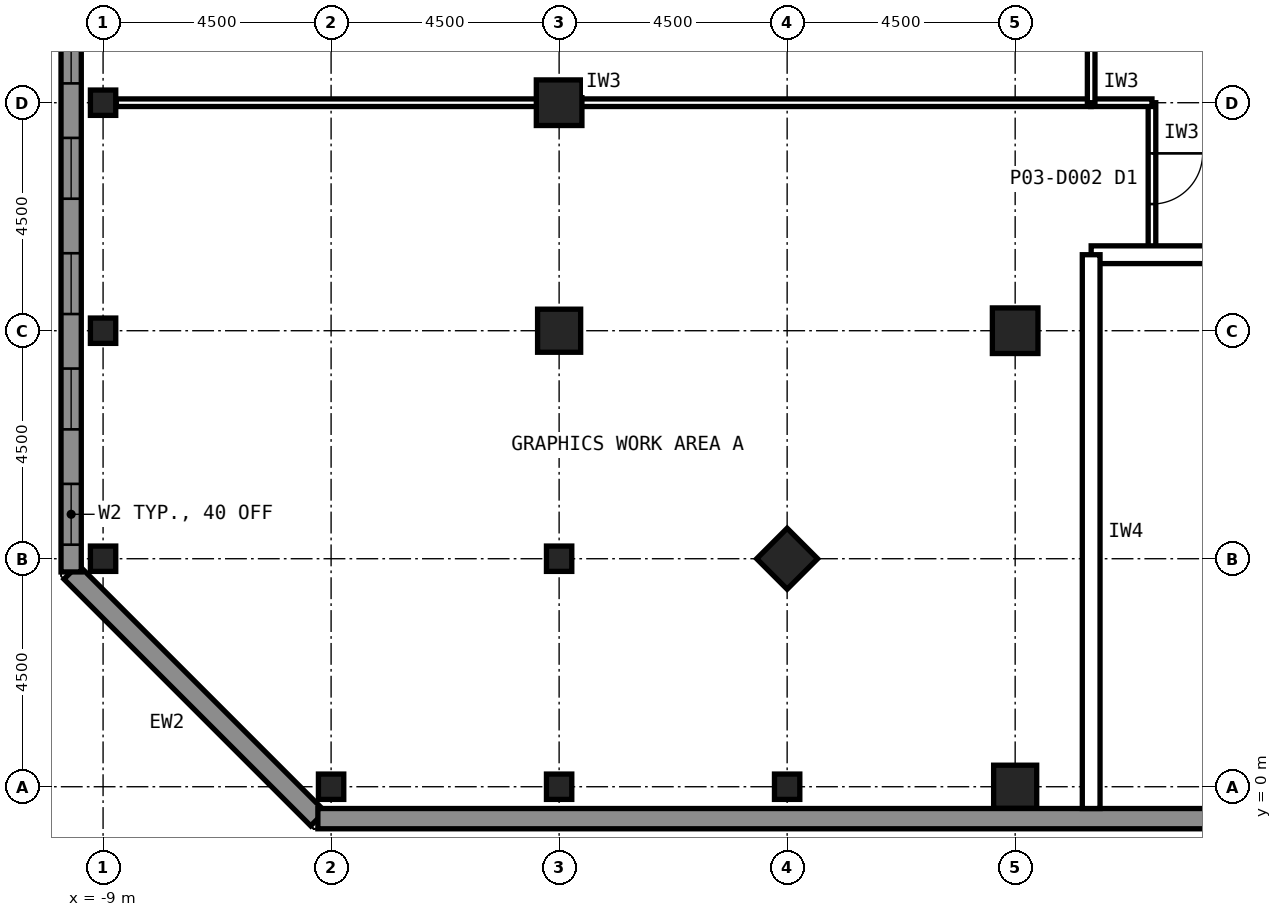
"""IFC4 building model, lengths in metres.
Left out: names, types, materials, properties, quantities, classifications, styles, units other than length and angle.
Written with IfcOpenShell. Run it as: python <this file> out.ifc"""

import sys

from ifc_helpers import new_model, si_unit, direction, frame, frame_2d, origin, origin_2d, place, context, subcontext, project, spatial, rectangle, hollow_rectangle, extrude, element, fill, save


model = new_model("IFC4")
c1 = context("Model", 3, precision=1e-05, world=origin(), true_north=direction((0.0, 1.0)))
c2 = subcontext(c1, "Body", "Model", "MODEL_VIEW")
j1 = project(units=[si_unit("LENGTHUNIT", "METRE"), si_unit("PLANEANGLEUNIT", "RADIAN")], contexts=[c1])
p1 = place(None, origin())
s1 = spatial("IfcSite", under=j1, at=p1, CompositionType="ELEMENT")
p2 = place(p1, origin())
s2 = spatial("IfcBuilding", under=s1, at=p2, CompositionType="ELEMENT")
p3 = place(p2, frame((0.0, 0.0, 12.0)))
s3 = spatial("IfcBuildingStorey", under=s2, at=p3, CompositionType="ELEMENT", Elevation=12.0)
p4 = place(p3, frame((9.0, 0.0, 0.0), z_axis=(0.0, 0.0, 1.0), x_axis=(1.0, 0.0, 0.0)))
e1 = element("IfcColumn", 1, at=p4, inside=s3, PredefinedType="COLUMN", context=c2, shape_type="SweptSolid", body=[
    extrude(hollow_rectangle(XDim=0.85, YDim=0.85, WallThickness=0.05, at=origin_2d()), origin(), (0.0, 0.0, 1.0), 6.0),
])
p5 = place(p3, frame((0.0, 13.5, 0.0), z_axis=(0.0, 0.0, 1.0), x_axis=(1.0, 0.0, 0.0)))
e2 = element("IfcColumn", 2, at=p5, inside=s3, PredefinedType="COLUMN", context=c2, shape_type="SweptSolid", body=[
    extrude(hollow_rectangle(XDim=0.9, YDim=0.9, WallThickness=0.063, at=origin_2d()), origin(), (0.0, 0.0, 1.0), 6.0),
])
for number, where, z_axis, x_axis in (
    (3, (0.0, 9.0, 0.0), (0.0, 0.0, 1.0), (1.0, 0.0, 0.0)),
    (4, (4.5, 4.5, 0.0), (0.0, 0.0, 1.0), (0.707, 0.707, 0.0)),
):
    element("IfcColumn", number, at=place(p3, frame(where, z_axis=z_axis, x_axis=x_axis)), inside=s3, PredefinedType="COLUMN", context=c2, shape_type="SweptSolid", body=[
        extrude(hollow_rectangle(XDim=0.85, YDim=0.85, WallThickness=0.05, at=origin_2d()), origin(), (0.0, 0.0, 1.0), 6.0),
    ])
p6 = place(p3, frame((9.0, 9.0, 0.0), z_axis=(0.0, 0.0, 1.0), x_axis=(1.0, 0.0, 0.0)))
e5 = element("IfcColumn", 5, at=p6, inside=s3, PredefinedType="COLUMN", context=c2, shape_type="SweptSolid", body=[
    extrude(hollow_rectangle(XDim=0.9, YDim=0.9, WallThickness=0.063, at=origin_2d()), origin(), (0.0, 0.0, 1.0), 6.0),
])
for number, where, z_axis, x_axis in (
    (6, (-9.0, 4.5, 0.0), (0.0, 0.0, 1.0), (1.0, 0.0, 0.0)),
    (7, (-9.0, 9.0, 0.0), (0.0, 0.0, 1.0), (1.0, 0.0, 0.0)),
    (8, (-9.0, 13.5, 0.0), (0.0, 0.0, 1.0), (1.0, 0.0, 0.0)),
    (9, (-4.5, 0.0, 0.0), (0.0, 0.0, 1.0), (1.0, 0.0, 0.0)),
    (10, (0.0, 0.0, 0.0), (0.0, 0.0, 1.0), (1.0, 0.0, 0.0)),
    (11, (4.5, 0.0, 0.0), (0.0, 0.0, 1.0), (1.0, 0.0, 0.0)),
    (12, (0.0, 4.5, 0.0), (0.0, 0.0, 1.0), (1.0, 0.0, 0.0)),
):
    element("IfcColumn", number, at=place(p3, frame(where, z_axis=z_axis, x_axis=x_axis)), inside=s3, PredefinedType="COLUMN", context=c2, shape_type="SweptSolid", body=[
        extrude(hollow_rectangle(XDim=0.5, YDim=0.5, WallThickness=0.022, at=origin_2d()), origin(), (0.0, 0.0, 1.0), 6.0),
    ])
p7 = place(p3, frame((-4.761, -0.63, 0.0), z_axis=(0.0, 0.0, 1.0), x_axis=(-0.707106781187, 0.707106781187, 0.0)))
e13 = element("IfcWall", 13, at=p7, inside=s3, PredefinedType="SOLIDWALL", context=c2, shape_type="SweptSolid", body=[
    extrude(rectangle(XDim=6.886, YDim=0.4, at=frame_2d((3.443, 0.0))), origin(), (0.0, 0.0, 1.0), 6.0),
])
p8 = place(p3, frame((-9.63, 4.239, 0.0), z_axis=(0.0, 0.0, 1.0), x_axis=(0.0, 1.0, 0.0)))
e14 = element("IfcWall", 14, at=p8, inside=s3, PredefinedType="SOLIDWALL", context=c2, shape_type="SweptSolid", body=[
    extrude(rectangle(XDim=45.522, YDim=0.4, at=frame_2d((22.761, 0.0))), origin(), (0.0, 0.0, 1.0), 6.0),
])
p9 = place(p8, frame((0.538, 0.0, 0.9)))
e15 = element("IfcOpeningElement", 15, at=p9, cuts=e14, PredefinedType="OPENING", context=c2, shape_type="SweptSolid", body=[
    extrude(rectangle(XDim=1.2, YDim=1.5, at=frame_2d((0.6, 0.75))), frame((0.0, 0.21, 0.0), z_axis=(0.0, -1.0, 0.0), x_axis=(1.0, 0.0, 0.0)), (0.0, 0.0, 1.0), 0.42),
])
p10 = place(p8, frame((2.814, 0.0, 0.9)))
e16 = element("IfcOpeningElement", 16, at=p10, cuts=e14, PredefinedType="OPENING", context=c2, shape_type="SweptSolid", body=[
    extrude(rectangle(XDim=1.2, YDim=1.5, at=frame_2d((0.6, 0.75))), frame((0.0, 0.21, 0.0), z_axis=(0.0, -1.0, 0.0), x_axis=(1.0, 0.0, 0.0)), (0.0, 0.0, 1.0), 0.42),
])
p11 = place(p8, frame((5.09, 0.0, 0.9)))
e17 = element("IfcOpeningElement", 17, at=p11, cuts=e14, PredefinedType="OPENING", context=c2, shape_type="SweptSolid", body=[
    extrude(rectangle(XDim=1.2, YDim=1.5, at=frame_2d((0.6, 0.75))), frame((0.0, 0.21, 0.0), z_axis=(0.0, -1.0, 0.0), x_axis=(1.0, 0.0, 0.0)), (0.0, 0.0, 1.0), 0.42),
])
p12 = place(p8, frame((7.366, 0.0, 0.9)))
e18 = element("IfcOpeningElement", 18, at=p12, cuts=e14, PredefinedType="OPENING", context=c2, shape_type="SweptSolid", body=[
    extrude(rectangle(XDim=1.2, YDim=1.5, at=frame_2d((0.6, 0.75))), frame((0.0, 0.21, 0.0), z_axis=(0.0, -1.0, 0.0), x_axis=(1.0, 0.0, 0.0)), (0.0, 0.0, 1.0), 0.42),
])
p13 = place(p8, frame((9.642, 0.0, 0.9)))
e19 = element("IfcOpeningElement", 19, at=p13, cuts=e14, PredefinedType="OPENING", context=c2, shape_type="SweptSolid", body=[
    extrude(rectangle(XDim=1.2, YDim=1.5, at=frame_2d((0.6, 0.75))), frame((0.0, 0.21, 0.0), z_axis=(0.0, -1.0, 0.0), x_axis=(1.0, 0.0, 0.0)), (0.0, 0.0, 1.0), 0.42),
])
p14 = place(p8, frame((11.918, 0.0, 0.9)))
e20 = element("IfcOpeningElement", 20, at=p14, cuts=e14, PredefinedType="OPENING", context=c2, shape_type="SweptSolid", body=[
    extrude(rectangle(XDim=1.2, YDim=1.5, at=frame_2d((0.6, 0.75))), frame((0.0, 0.21, 0.0), z_axis=(0.0, -1.0, 0.0), x_axis=(1.0, 0.0, 0.0)), (0.0, 0.0, 1.0), 0.42),
])
p15 = place(p8, frame((14.195, 0.0, 0.9)))
e21 = element("IfcOpeningElement", 21, at=p15, cuts=e14, PredefinedType="OPENING", context=c2, shape_type="SweptSolid", body=[
    extrude(rectangle(XDim=1.2, YDim=1.5, at=frame_2d((0.6, 0.75))), frame((0.0, 0.21, 0.0), z_axis=(0.0, -1.0, 0.0), x_axis=(1.0, 0.0, 0.0)), (0.0, 0.0, 1.0), 0.42),
])
p16 = place(p8, frame((16.471, 0.0, 0.9)))
e22 = element("IfcOpeningElement", 22, at=p16, cuts=e14, PredefinedType="OPENING", context=c2, shape_type="SweptSolid", body=[
    extrude(rectangle(XDim=1.2, YDim=1.5, at=frame_2d((0.6, 0.75))), frame((0.0, 0.21, 0.0), z_axis=(0.0, -1.0, 0.0), x_axis=(1.0, 0.0, 0.0)), (0.0, 0.0, 1.0), 0.42),
])
p17 = place(p8, frame((18.747, 0.0, 0.9)))
e23 = element("IfcOpeningElement", 23, at=p17, cuts=e14, PredefinedType="OPENING", context=c2, shape_type="SweptSolid", body=[
    extrude(rectangle(XDim=1.2, YDim=1.5, at=frame_2d((0.6, 0.75))), frame((0.0, 0.21, 0.0), z_axis=(0.0, -1.0, 0.0), x_axis=(1.0, 0.0, 0.0)), (0.0, 0.0, 1.0), 0.42),
])
p18 = place(p8, frame((21.023, 0.0, 0.9)))
e24 = element("IfcOpeningElement", 24, at=p18, cuts=e14, PredefinedType="OPENING", context=c2, shape_type="SweptSolid", body=[
    extrude(rectangle(XDim=1.2, YDim=1.5, at=frame_2d((0.6, 0.75))), frame((0.0, 0.21, 0.0), z_axis=(0.0, -1.0, 0.0), x_axis=(1.0, 0.0, 0.0)), (0.0, 0.0, 1.0), 0.42),
])
p19 = place(p8, frame((23.299, 0.0, 0.9)))
e25 = element("IfcOpeningElement", 25, at=p19, cuts=e14, PredefinedType="OPENING", context=c2, shape_type="SweptSolid", body=[
    extrude(rectangle(XDim=1.2, YDim=1.5, at=frame_2d((0.6, 0.75))), frame((0.0, 0.21, 0.0), z_axis=(0.0, -1.0, 0.0), x_axis=(1.0, 0.0, 0.0)), (0.0, 0.0, 1.0), 0.42),
])
p20 = place(p8, frame((25.575, 0.0, 0.9)))
e26 = element("IfcOpeningElement", 26, at=p20, cuts=e14, PredefinedType="OPENING", context=c2, shape_type="SweptSolid", body=[
    extrude(rectangle(XDim=1.2, YDim=1.5, at=frame_2d((0.6, 0.75))), frame((0.0, 0.21, 0.0), z_axis=(0.0, -1.0, 0.0), x_axis=(1.0, 0.0, 0.0)), (0.0, 0.0, 1.0), 0.42),
])
p21 = place(p8, frame((27.851, 0.0, 0.9)))
e27 = element("IfcOpeningElement", 27, at=p21, cuts=e14, PredefinedType="OPENING", context=c2, shape_type="SweptSolid", body=[
    extrude(rectangle(XDim=1.2, YDim=1.5, at=frame_2d((0.6, 0.75))), frame((0.0, 0.21, 0.0), z_axis=(0.0, -1.0, 0.0), x_axis=(1.0, 0.0, 0.0)), (0.0, 0.0, 1.0), 0.42),
])
p22 = place(p8, frame((30.127, 0.0, 0.9)))
e28 = element("IfcOpeningElement", 28, at=p22, cuts=e14, PredefinedType="OPENING", context=c2, shape_type="SweptSolid", body=[
    extrude(rectangle(XDim=1.2, YDim=1.5, at=frame_2d((0.6, 0.75))), frame((0.0, 0.21, 0.0), z_axis=(0.0, -1.0, 0.0), x_axis=(1.0, 0.0, 0.0)), (0.0, 0.0, 1.0), 0.42),
])
p23 = place(p8, frame((32.404, 0.0, 0.9)))
e29 = element("IfcOpeningElement", 29, at=p23, cuts=e14, PredefinedType="OPENING", context=c2, shape_type="SweptSolid", body=[
    extrude(rectangle(XDim=1.2, YDim=1.5, at=frame_2d((0.6, 0.75))), frame((0.0, 0.21, 0.0), z_axis=(0.0, -1.0, 0.0), x_axis=(1.0, 0.0, 0.0)), (0.0, 0.0, 1.0), 0.42),
])
p24 = place(p8, frame((34.679, 0.0, 0.9)))
e30 = element("IfcOpeningElement", 30, at=p24, cuts=e14, PredefinedType="OPENING", context=c2, shape_type="SweptSolid", body=[
    extrude(rectangle(XDim=1.2, YDim=1.5, at=frame_2d((0.6, 0.75))), frame((0.0, 0.21, 0.0), z_axis=(0.0, -1.0, 0.0), x_axis=(1.0, 0.0, 0.0)), (0.0, 0.0, 1.0), 0.42),
])
p25 = place(p8, frame((36.956, 0.0, 0.9)))
e31 = element("IfcOpeningElement", 31, at=p25, cuts=e14, PredefinedType="OPENING", context=c2, shape_type="SweptSolid", body=[
    extrude(rectangle(XDim=1.2, YDim=1.5, at=frame_2d((0.6, 0.75))), frame((0.0, 0.21, 0.0), z_axis=(0.0, -1.0, 0.0), x_axis=(1.0, 0.0, 0.0)), (0.0, 0.0, 1.0), 0.42),
])
p26 = place(p8, frame((39.232, 0.0, 0.9)))
e32 = element("IfcOpeningElement", 32, at=p26, cuts=e14, PredefinedType="OPENING", context=c2, shape_type="SweptSolid", body=[
    extrude(rectangle(XDim=1.2, YDim=1.5, at=frame_2d((0.6, 0.75))), frame((0.0, 0.21, 0.0), z_axis=(0.0, -1.0, 0.0), x_axis=(1.0, 0.0, 0.0)), (0.0, 0.0, 1.0), 0.42),
])
p27 = place(p8, frame((41.508, 0.0, 0.9)))
e33 = element("IfcOpeningElement", 33, at=p27, cuts=e14, PredefinedType="OPENING", context=c2, shape_type="SweptSolid", body=[
    extrude(rectangle(XDim=1.2, YDim=1.5, at=frame_2d((0.6, 0.75))), frame((0.0, 0.21, 0.0), z_axis=(0.0, -1.0, 0.0), x_axis=(1.0, 0.0, 0.0)), (0.0, 0.0, 1.0), 0.42),
])
p28 = place(p8, frame((43.784, 0.0, 0.9)))
e34 = element("IfcOpeningElement", 34, at=p28, cuts=e14, PredefinedType="OPENING", context=c2, shape_type="SweptSolid", body=[
    extrude(rectangle(XDim=1.2, YDim=1.5, at=frame_2d((0.6, 0.75))), frame((0.0, 0.21, 0.0), z_axis=(0.0, -1.0, 0.0), x_axis=(1.0, 0.0, 0.0)), (0.0, 0.0, 1.0), 0.42),
])
p29 = place(p3, frame((58.761, -0.63, 0.0), z_axis=(0.0, 0.0, 1.0), x_axis=(-1.0, 0.0, 0.0)))
e35 = element("IfcWall", 35, at=p29, inside=s3, PredefinedType="SOLIDWALL", context=c2, shape_type="SweptSolid", body=[
    extrude(rectangle(XDim=63.522, YDim=0.4, at=frame_2d((31.761, 0.0))), origin(), (0.0, 0.0, 1.0), 6.0),
])
p30 = place(p3, frame((11.7, 13.5, 0.0), z_axis=(0.0, 0.0, 1.0), x_axis=(0.0, -1.0, 0.0)))
e36 = element("IfcWall", 36, at=p30, inside=s3, PredefinedType="PARTITIONING", context=c2, shape_type="SweptSolid", body=[
    extrude(rectangle(XDim=3.0, YDim=0.15, at=frame_2d((1.5, 0.0))), origin(), (0.0, 0.0, 1.0), 5.8),
])
p31 = place(p30, frame((1.0, 0.0, 0.0)))
e37 = element("IfcOpeningElement", 37, at=p31, cuts=e36, PredefinedType="OPENING", context=c2, shape_type="SweptSolid", body=[
    extrude(rectangle(XDim=1.0, YDim=2.1, at=frame_2d((0.5, 1.05))), frame((0.0, 0.085, 0.0), z_axis=(0.0, -1.0, 0.0), x_axis=(1.0, 0.0, 0.0)), (0.0, 0.0, 1.0), 0.17),
])
p32 = place(p3, frame((10.49, 13.5, 0.0), z_axis=(0.0, 0.0, 1.0), x_axis=(1.0, 0.0, 0.0)))
e38 = element("IfcWall", 38, at=p32, inside=s3, PredefinedType="PARTITIONING", context=c2, shape_type="SweptSolid", body=[
    extrude(rectangle(XDim=1.21, YDim=0.15, at=frame_2d((0.605, 0.0))), origin(), (0.0, 0.0, 1.0), 4.949),
])
p33 = place(p3, frame((43.5, 10.5, 0.0), z_axis=(0.0, 0.0, 1.0), x_axis=(-1.0, 0.0, 0.0)))
e39 = element("IfcWall", 39, at=p33, inside=s3, PredefinedType="PARTITIONING", context=c2, shape_type="SweptSolid", body=[
    extrude(rectangle(XDim=33.0, YDim=0.35, at=frame_2d((16.5, 0.0))), origin(), (0.0, 0.0, 1.0), 5.8),
])
p34 = place(p33, frame((15.3, 0.0, 0.0)))
e40 = element("IfcOpeningElement", 40, at=p34, cuts=e39, PredefinedType="OPENING", context=c2, shape_type="SweptSolid", body=[
    extrude(rectangle(XDim=2.4, YDim=3.0, at=frame_2d((1.2, 1.5))), frame((0.0, 0.185, 0.0), z_axis=(0.0, -1.0, 0.0), x_axis=(1.0, 0.0, 0.0)), (0.0, 0.0, 1.0), 0.37),
])
p35 = place(p3, frame((10.5, 10.5, 0.0), z_axis=(0.0, 0.0, 1.0), x_axis=(0.0, -1.0, 0.0)))
e41 = element("IfcWall", 41, at=p35, inside=s3, PredefinedType="PARTITIONING", context=c2, shape_type="SweptSolid", body=[
    extrude(rectangle(XDim=10.93, YDim=0.35, at=frame_2d((5.465, 0.0))), origin(), (0.0, 0.0, 1.0), 5.8),
])
p36 = place(p3, frame((-8.74, 13.5, 0.0), z_axis=(0.0, 0.0, 1.0), x_axis=(1.0, 0.0, 0.0)))
e42 = element("IfcWall", 42, at=p36, inside=s3, PredefinedType="PARTITIONING", context=c2, shape_type="SweptSolid", body=[
    extrude(rectangle(XDim=19.24, YDim=0.15, at=frame_2d((9.62, 0.0))), origin(), (0.0, 0.0, 1.0), 4.949),
])
p37 = place(p3, frame((10.5, 13.5, 0.0), z_axis=(0.0, 0.0, 1.0), x_axis=(0.0, 1.0, 0.0)))
e43 = element("IfcWall", 43, at=p37, inside=s3, PredefinedType="PARTITIONING", context=c2, shape_type="SweptSolid", body=[
    extrude(rectangle(XDim=27.0, YDim=0.15, at=frame_2d((13.5, 0.0))), origin(), (0.0, 0.0, 1.0), 5.8),
])
p38 = place(p37, frame((13.0, 0.0, 0.0)))
e44 = element("IfcOpeningElement", 44, at=p38, cuts=e43, PredefinedType="OPENING", context=c2, shape_type="SweptSolid", body=[
    extrude(rectangle(XDim=1.0, YDim=2.1, at=frame_2d((0.5, 1.05))), frame((0.0, 0.085, 0.0), z_axis=(0.0, -1.0, 0.0), x_axis=(1.0, 0.0, 0.0)), (0.0, 0.0, 1.0), 0.17),
])
p39 = place(p9, origin())
e45 = element("IfcWindow", 45, at=p39, inside=s3, PartitioningType="SINGLE_PANEL", PredefinedType="WINDOW", context=c2, shape_type="SweptSolid", body=[
    extrude(rectangle(XDim=1.2, YDim=1.5, at=frame_2d((0.6, 0.75))), frame((0.0, 0.03, 0.0), z_axis=(0.0, -1.0, 0.0), x_axis=(1.0, 0.0, 0.0)), (0.0, 0.0, 1.0), 0.06),
])
fill(e15, e45)
p40 = place(p10, origin())
e46 = element("IfcWindow", 46, at=p40, inside=s3, PartitioningType="SINGLE_PANEL", PredefinedType="WINDOW", context=c2, shape_type="SweptSolid", body=[
    extrude(rectangle(XDim=1.2, YDim=1.5, at=frame_2d((0.6, 0.75))), frame((0.0, 0.03, 0.0), z_axis=(0.0, -1.0, 0.0), x_axis=(1.0, 0.0, 0.0)), (0.0, 0.0, 1.0), 0.06),
])
fill(e16, e46)
p41 = place(p11, origin())
e47 = element("IfcWindow", 47, at=p41, inside=s3, PartitioningType="SINGLE_PANEL", PredefinedType="WINDOW", context=c2, shape_type="SweptSolid", body=[
    extrude(rectangle(XDim=1.2, YDim=1.5, at=frame_2d((0.6, 0.75))), frame((0.0, 0.03, 0.0), z_axis=(0.0, -1.0, 0.0), x_axis=(1.0, 0.0, 0.0)), (0.0, 0.0, 1.0), 0.06),
])
fill(e17, e47)
p42 = place(p12, origin())
e48 = element("IfcWindow", 48, at=p42, inside=s3, PartitioningType="SINGLE_PANEL", PredefinedType="WINDOW", context=c2, shape_type="SweptSolid", body=[
    extrude(rectangle(XDim=1.2, YDim=1.5, at=frame_2d((0.6, 0.75))), frame((0.0, 0.03, 0.0), z_axis=(0.0, -1.0, 0.0), x_axis=(1.0, 0.0, 0.0)), (0.0, 0.0, 1.0), 0.06),
])
fill(e18, e48)
p43 = place(p13, origin())
e49 = element("IfcWindow", 49, at=p43, inside=s3, PartitioningType="SINGLE_PANEL", PredefinedType="WINDOW", context=c2, shape_type="SweptSolid", body=[
    extrude(rectangle(XDim=1.2, YDim=1.5, at=frame_2d((0.6, 0.75))), frame((0.0, 0.03, 0.0), z_axis=(0.0, -1.0, 0.0), x_axis=(1.0, 0.0, 0.0)), (0.0, 0.0, 1.0), 0.06),
])
fill(e19, e49)
p44 = place(p31, origin())
e50 = element("IfcDoor", 50, at=p44, inside=s3, OperationType="SINGLE_SWING_LEFT", PredefinedType="DOOR", context=c2, shape_type="SweptSolid", body=[
    extrude(rectangle(XDim=1.0, YDim=2.1, at=frame_2d((0.5, 1.05))), frame((0.0, 0.025, 0.0), z_axis=(0.0, -1.0, 0.0), x_axis=(1.0, 0.0, 0.0)), (0.0, 0.0, 1.0), 0.05),
])
fill(e37, e50)
save(model, sys.argv[1])
